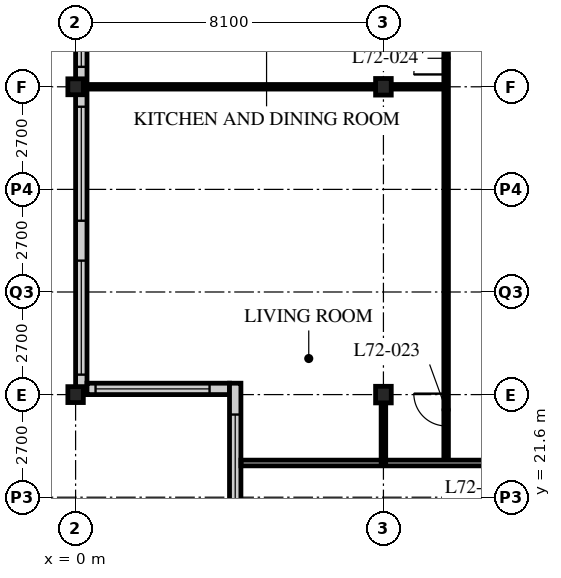
"""IFC4 building model, lengths in metres.
Left out: names, types, materials, properties, quantities, classifications, styles, units other than length and angle.
Written with IfcOpenShell. Run it as: python <this file> out.ifc"""

import sys

from ifc_helpers import new_model, si_unit, direction, frame, frame_2d, origin, origin_2d, place, context, subcontext, project, spatial, rectangle, i_section, extrude, element, fill, save


model = new_model("IFC4")
c1 = context("Model", 3, precision=1e-05, world=origin(), true_north=direction((0.0, 1.0)))
c2 = subcontext(c1, "Body", "Model", "MODEL_VIEW")
j1 = project(units=[si_unit("LENGTHUNIT", "METRE"), si_unit("PLANEANGLEUNIT", "RADIAN")], contexts=[c1])
p1 = place(None, origin())
s1 = spatial("IfcSite", under=j1, at=p1, CompositionType="ELEMENT")
p2 = place(p1, origin())
s2 = spatial("IfcBuilding", under=s1, at=p2, CompositionType="ELEMENT")
p3 = place(p2, frame((0.0, 0.0, 281.4)))
s3 = spatial("IfcBuildingStorey", under=s2, at=p3, CompositionType="ELEMENT", Elevation=281.4)
for number, where, z_axis, x_axis in (
    (1, (0.0, 24.3, 0.0), (0.0, 0.0, 1.0), (1.0, 0.0, 0.0)),
    (2, (0.0, 32.4, 0.0), (0.0, 0.0, 1.0), (1.0, 0.0, 0.0)),
):
    element("IfcColumn", number, at=place(p3, frame(where, z_axis=z_axis, x_axis=x_axis)), inside=s3, PredefinedType="COLUMN", context=c2, shape_type="SweptSolid", body=[
        extrude(i_section(OverallWidth=0.407, OverallDepth=0.419, WebThickness=0.031, FlangeThickness=0.049, FilletRadius=0.015, at=origin_2d()), origin(), (0.0, 0.0, 1.0), 3.9),
    ])
for number, where, z_axis, x_axis in (
    (3, (8.1, 24.3, 0.0), (0.0, 0.0, 1.0), (1.0, 0.0, 0.0)),
    (4, (8.1, 32.4, 0.0), (0.0, 0.0, 1.0), (1.0, 0.0, 0.0)),
):
    element("IfcColumn", number, at=place(p3, frame(where, z_axis=z_axis, x_axis=x_axis)), inside=s3, PredefinedType="COLUMN", context=c2, shape_type="SweptSolid", body=[
        extrude(i_section(OverallWidth=0.412, OverallDepth=0.437, WebThickness=0.036, FlangeThickness=0.058, FilletRadius=0.015, at=origin_2d()), origin(), (0.0, 0.0, 1.0), 3.9),
    ])
p4 = place(p3, frame((0.15, 56.4, 0.0), z_axis=(0.0, 0.0, 1.0), x_axis=(0.0, -1.0, 0.0)))
e5 = element("IfcWall", 5, at=p4, inside=s3, PredefinedType="SOLIDWALL", context=c2, shape_type="SweptSolid", body=[
    extrude(rectangle(XDim=32.1, YDim=0.3, at=frame_2d((16.05, 0.0))), origin(), (0.0, 0.0, 1.0), 3.69),
])
p5 = place(p4, frame((0.225, 0.0, 0.6)))
e6 = element("IfcOpeningElement", 6, at=p5, cuts=e5, PredefinedType="OPENING", context=c2, shape_type="SweptSolid", body=[
    extrude(rectangle(XDim=3.0, YDim=2.4, at=frame_2d((1.5, 1.2))), frame((0.0, 0.16, 0.0), z_axis=(0.0, -1.0, 0.0), x_axis=(1.0, 0.0, 0.0)), (0.0, 0.0, 1.0), 0.32),
])
p6 = place(p4, frame((4.275, 0.0, 0.6)))
e7 = element("IfcOpeningElement", 7, at=p6, cuts=e5, PredefinedType="OPENING", context=c2, shape_type="SweptSolid", body=[
    extrude(rectangle(XDim=3.0, YDim=2.4, at=frame_2d((1.5, 1.2))), frame((0.0, 0.16, 0.0), z_axis=(0.0, -1.0, 0.0), x_axis=(1.0, 0.0, 0.0)), (0.0, 0.0, 1.0), 0.32),
])
p7 = place(p4, frame((8.325, 0.0, 0.6)))
e8 = element("IfcOpeningElement", 8, at=p7, cuts=e5, PredefinedType="OPENING", context=c2, shape_type="SweptSolid", body=[
    extrude(rectangle(XDim=3.0, YDim=2.4, at=frame_2d((1.5, 1.2))), frame((0.0, 0.16, 0.0), z_axis=(0.0, -1.0, 0.0), x_axis=(1.0, 0.0, 0.0)), (0.0, 0.0, 1.0), 0.32),
])
p8 = place(p4, frame((12.375, 0.0, 0.6)))
e9 = element("IfcOpeningElement", 9, at=p8, cuts=e5, PredefinedType="OPENING", context=c2, shape_type="SweptSolid", body=[
    extrude(rectangle(XDim=3.0, YDim=2.4, at=frame_2d((1.5, 1.2))), frame((0.0, 0.16, 0.0), z_axis=(0.0, -1.0, 0.0), x_axis=(1.0, 0.0, 0.0)), (0.0, 0.0, 1.0), 0.32),
])
p9 = place(p4, frame((16.425, 0.0, 0.6)))
e10 = element("IfcOpeningElement", 10, at=p9, cuts=e5, PredefinedType="OPENING", context=c2, shape_type="SweptSolid", body=[
    extrude(rectangle(XDim=3.0, YDim=2.4, at=frame_2d((1.5, 1.2))), frame((0.0, 0.16, 0.0), z_axis=(0.0, -1.0, 0.0), x_axis=(1.0, 0.0, 0.0)), (0.0, 0.0, 1.0), 0.32),
])
p10 = place(p4, frame((20.475, 0.0, 0.6)))
e11 = element("IfcOpeningElement", 11, at=p10, cuts=e5, PredefinedType="OPENING", context=c2, shape_type="SweptSolid", body=[
    extrude(rectangle(XDim=3.0, YDim=2.4, at=frame_2d((1.5, 1.2))), frame((0.0, 0.16, 0.0), z_axis=(0.0, -1.0, 0.0), x_axis=(1.0, 0.0, 0.0)), (0.0, 0.0, 1.0), 0.32),
])
p11 = place(p4, frame((24.525, 0.0, 0.6)))
e12 = element("IfcOpeningElement", 12, at=p11, cuts=e5, PredefinedType="OPENING", context=c2, shape_type="SweptSolid", body=[
    extrude(rectangle(XDim=3.0, YDim=2.4, at=frame_2d((1.5, 1.2))), frame((0.0, 0.16, 0.0), z_axis=(0.0, -1.0, 0.0), x_axis=(1.0, 0.0, 0.0)), (0.0, 0.0, 1.0), 0.32),
])
p12 = place(p4, frame((28.575, 0.0, 0.6)))
e13 = element("IfcOpeningElement", 13, at=p12, cuts=e5, PredefinedType="OPENING", context=c2, shape_type="SweptSolid", body=[
    extrude(rectangle(XDim=3.0, YDim=2.4, at=frame_2d((1.5, 1.2))), frame((0.0, 0.16, 0.0), z_axis=(0.0, -1.0, 0.0), x_axis=(1.0, 0.0, 0.0)), (0.0, 0.0, 1.0), 0.32),
])
p13 = place(p3, frame((0.3, 24.45, 0.0), z_axis=(0.0, 0.0, 1.0), x_axis=(1.0, 0.0, 0.0)))
e14 = element("IfcWall", 14, at=p13, inside=s3, PredefinedType="SOLIDWALL", context=c2, shape_type="SweptSolid", body=[
    extrude(rectangle(XDim=3.75, YDim=0.3, at=frame_2d((1.875, 0.0))), origin(), (0.0, 0.0, 1.0), 3.69),
])
p14 = place(p13, frame((0.225, 0.0, 0.6)))
e15 = element("IfcOpeningElement", 15, at=p14, cuts=e14, PredefinedType="OPENING", context=c2, shape_type="SweptSolid", body=[
    extrude(rectangle(XDim=3.0, YDim=2.3, at=frame_2d((1.5, 1.15))), frame((0.0, 0.16, 0.0), z_axis=(0.0, -1.0, 0.0), x_axis=(1.0, 0.0, 0.0)), (0.0, 0.0, 1.0), 0.32),
])
p15 = place(p3, frame((4.2, 24.6, 0.0), z_axis=(0.0, 0.0, 1.0), x_axis=(0.0, -1.0, 0.0)))
e16 = element("IfcWall", 16, at=p15, inside=s3, PredefinedType="SOLIDWALL", context=c2, shape_type="SweptSolid", body=[
    extrude(rectangle(XDim=4.35, YDim=0.3, at=frame_2d((2.175, 0.0))), origin(), (0.0, 0.0, 1.0), 3.69),
])
p16 = place(p15, frame((0.825, 0.0, 0.6)))
e17 = element("IfcOpeningElement", 17, at=p16, cuts=e16, PredefinedType="OPENING", context=c2, shape_type="SweptSolid", body=[
    extrude(rectangle(XDim=3.0, YDim=2.3, at=frame_2d((1.5, 1.15))), frame((0.0, 0.16, 0.0), z_axis=(0.0, -1.0, 0.0), x_axis=(1.0, 0.0, 0.0)), (0.0, 0.0, 1.0), 0.32),
])
p17 = place(p3, frame((9.75, 22.5, 0.0), z_axis=(0.0, 0.0, 1.0), x_axis=(0.0, 1.0, 0.0)))
e18 = element("IfcWall", 18, at=p17, inside=s3, PredefinedType="PARTITIONING", context=c2, shape_type="SweptSolid", body=[
    extrude(rectangle(XDim=26.1, YDim=0.12, at=frame_2d((13.05, 0.0))), origin(), (0.0, 0.0, 1.0), 3.69),
])
p18 = place(p17, frame((0.975, 0.0, 0.0)))
e19 = element("IfcOpeningElement", 19, at=p18, cuts=e18, PredefinedType="OPENING", context=c2, shape_type="SweptSolid", body=[
    extrude(rectangle(XDim=0.85, YDim=2.1, at=frame_2d((0.425, 1.05))), frame((0.0, 0.07, 0.0), z_axis=(0.0, -1.0, 0.0), x_axis=(1.0, 0.0, 0.0)), (0.0, 0.0, 1.0), 0.14),
])
p19 = place(p17, frame((10.225, 0.0, 0.0)))
e20 = element("IfcOpeningElement", 20, at=p19, cuts=e18, PredefinedType="OPENING", context=c2, shape_type="SweptSolid", body=[
    extrude(rectangle(XDim=0.85, YDim=2.1, at=frame_2d((0.425, 1.05))), frame((0.0, 0.07, 0.0), z_axis=(0.0, -1.0, 0.0), x_axis=(1.0, 0.0, 0.0)), (0.0, 0.0, 1.0), 0.14),
])
p20 = place(p17, frame((14.275, 0.0, 0.0)))
e21 = element("IfcOpeningElement", 21, at=p20, cuts=e18, PredefinedType="OPENING", context=c2, shape_type="SweptSolid", body=[
    extrude(rectangle(XDim=0.85, YDim=2.1, at=frame_2d((0.425, 1.05))), frame((0.0, 0.07, 0.0), z_axis=(0.0, -1.0, 0.0), x_axis=(1.0, 0.0, 0.0)), (0.0, 0.0, 1.0), 0.14),
])
p21 = place(p17, frame((18.325, 0.0, 0.0)))
e22 = element("IfcOpeningElement", 22, at=p21, cuts=e18, PredefinedType="OPENING", context=c2, shape_type="SweptSolid", body=[
    extrude(rectangle(XDim=0.85, YDim=2.1, at=frame_2d((0.425, 1.05))), frame((0.0, 0.07, 0.0), z_axis=(0.0, -1.0, 0.0), x_axis=(1.0, 0.0, 0.0)), (0.0, 0.0, 1.0), 0.14),
])
p22 = place(p17, frame((22.375, 0.0, 0.0)))
e23 = element("IfcOpeningElement", 23, at=p22, cuts=e18, PredefinedType="OPENING", context=c2, shape_type="SweptSolid", body=[
    extrude(rectangle(XDim=0.85, YDim=2.1, at=frame_2d((0.425, 1.05))), frame((0.0, 0.07, 0.0), z_axis=(0.0, -1.0, 0.0), x_axis=(1.0, 0.0, 0.0)), (0.0, 0.0, 1.0), 0.14),
])
p23 = place(p3, frame((9.75, 32.4, 0.0), z_axis=(0.0, 0.0, 1.0), x_axis=(-1.0, 0.0, 0.0)))
e24 = element("IfcWall", 24, at=p23, inside=s3, PredefinedType="PARTITIONING", context=c2, shape_type="SweptSolid", body=[
    extrude(rectangle(XDim=9.45, YDim=0.12, at=frame_2d((4.725, 0.0))), origin(), (0.0, 0.0, 1.0), 3.078),
])
p24 = place(p3, frame((4.35, 22.5, 0.0), z_axis=(0.0, 0.0, 1.0), x_axis=(1.0, 0.0, 0.0)))
e25 = element("IfcWall", 25, at=p24, inside=s3, PredefinedType="PARTITIONING", context=c2, shape_type="SweptSolid", body=[
    extrude(rectangle(XDim=7.8, YDim=0.15, at=frame_2d((3.9, 0.0))), origin(), (0.0, 0.0, 1.0), 3.69),
])
p25 = place(p3, frame((8.1, 22.5, 0.0), z_axis=(0.0, 0.0, 1.0), x_axis=(0.0, 1.0, 0.0)))
e26 = element("IfcWall", 26, at=p25, inside=s3, PredefinedType="PARTITIONING", context=c2, shape_type="SweptSolid", body=[
    extrude(rectangle(XDim=1.597, YDim=0.12, at=frame_2d((0.798, 0.0))), origin(), (0.0, 0.0, 1.0), 3.078),
])
p26 = place(p10, origin())
e27 = element("IfcWindow", 27, at=p26, inside=s3, PartitioningType="SINGLE_PANEL", PredefinedType="WINDOW", context=c2, shape_type="SweptSolid", body=[
    extrude(rectangle(XDim=3.0, YDim=2.4, at=frame_2d((1.5, 1.2))), frame((0.0, 0.03, 0.0), z_axis=(0.0, -1.0, 0.0), x_axis=(1.0, 0.0, 0.0)), (0.0, 0.0, 1.0), 0.06),
])
fill(e11, e27)
p27 = place(p11, origin())
e28 = element("IfcWindow", 28, at=p27, inside=s3, PartitioningType="SINGLE_PANEL", PredefinedType="WINDOW", context=c2, shape_type="SweptSolid", body=[
    extrude(rectangle(XDim=3.0, YDim=2.4, at=frame_2d((1.5, 1.2))), frame((0.0, 0.03, 0.0), z_axis=(0.0, -1.0, 0.0), x_axis=(1.0, 0.0, 0.0)), (0.0, 0.0, 1.0), 0.06),
])
fill(e12, e28)
p28 = place(p12, origin())
e29 = element("IfcWindow", 29, at=p28, inside=s3, PartitioningType="SINGLE_PANEL", PredefinedType="WINDOW", context=c2, shape_type="SweptSolid", body=[
    extrude(rectangle(XDim=3.0, YDim=2.4, at=frame_2d((1.5, 1.2))), frame((0.0, 0.03, 0.0), z_axis=(0.0, -1.0, 0.0), x_axis=(1.0, 0.0, 0.0)), (0.0, 0.0, 1.0), 0.06),
])
fill(e13, e29)
p29 = place(p14, origin())
e30 = element("IfcWindow", 30, at=p29, inside=s3, PartitioningType="SINGLE_PANEL", PredefinedType="WINDOW", context=c2, shape_type="SweptSolid", body=[
    extrude(rectangle(XDim=3.0, YDim=2.3, at=frame_2d((1.5, 1.15))), frame((0.0, 0.03, 0.0), z_axis=(0.0, -1.0, 0.0), x_axis=(1.0, 0.0, 0.0)), (0.0, 0.0, 1.0), 0.06),
])
fill(e15, e30)
p30 = place(p16, origin())
e31 = element("IfcWindow", 31, at=p30, inside=s3, PartitioningType="SINGLE_PANEL", PredefinedType="WINDOW", context=c2, shape_type="SweptSolid", body=[
    extrude(rectangle(XDim=3.0, YDim=2.3, at=frame_2d((1.5, 1.15))), frame((0.0, 0.03, 0.0), z_axis=(0.0, -1.0, 0.0), x_axis=(1.0, 0.0, 0.0)), (0.0, 0.0, 1.0), 0.06),
])
fill(e17, e31)
p31 = place(p18, origin())
e32 = element("IfcDoor", 32, at=p31, inside=s3, OperationType="SINGLE_SWING_RIGHT", PredefinedType="DOOR", context=c2, shape_type="SweptSolid", body=[
    extrude(rectangle(XDim=0.85, YDim=2.1, at=frame_2d((0.425, 1.05))), frame((0.0, 0.025, 0.0), z_axis=(0.0, -1.0, 0.0), x_axis=(1.0, 0.0, 0.0)), (0.0, 0.0, 1.0), 0.05),
])
fill(e19, e32)
p32 = place(p19, origin())
e33 = element("IfcDoor", 33, at=p32, inside=s3, OperationType="SINGLE_SWING_LEFT", PredefinedType="DOOR", context=c2, shape_type="SweptSolid", body=[
    extrude(rectangle(XDim=0.85, YDim=2.1, at=frame_2d((0.425, 1.05))), frame((0.0, 0.025, 0.0), z_axis=(0.0, -1.0, 0.0), x_axis=(1.0, 0.0, 0.0)), (0.0, 0.0, 1.0), 0.05),
])
fill(e20, e33)
save(model, sys.argv[1])
